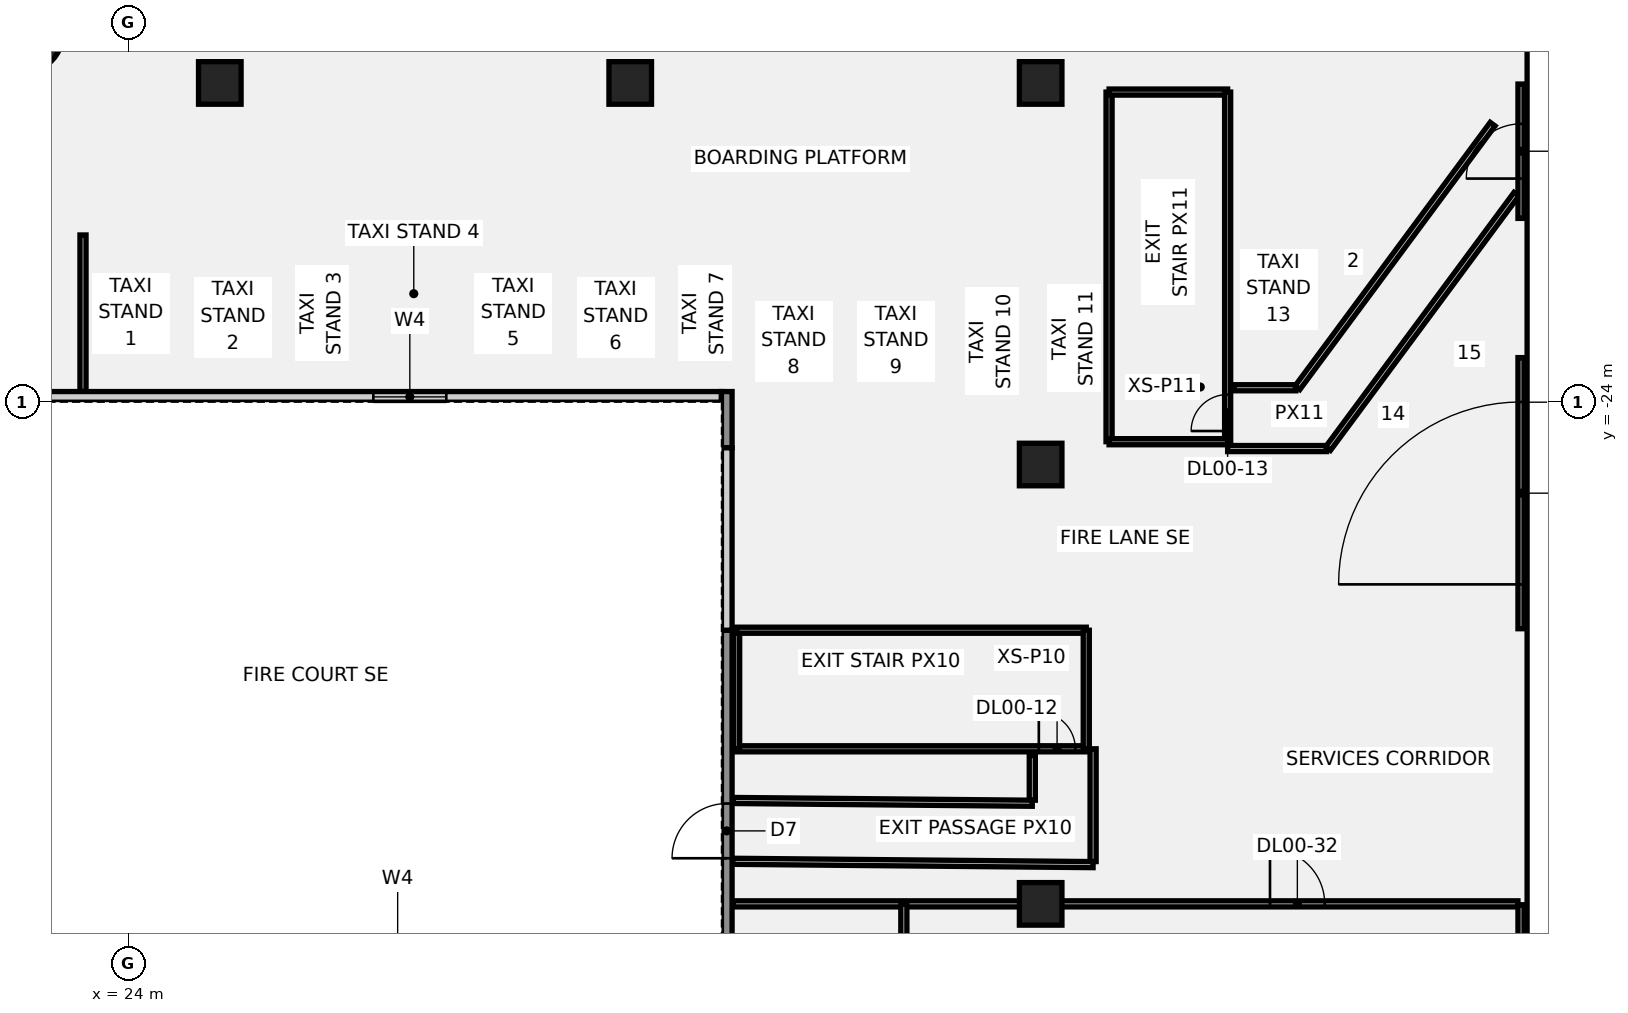
"""IFC4 building model, lengths in metres.
Left out: names, types, materials, properties, quantities, classifications, styles, units other than length and angle.
Written with IfcOpenShell. Run it as: python <this file> out.ifc"""

import sys

from ifc_helpers import new_model, si_unit, direction, frame, frame_2d, origin, origin_2d, place, context, subcontext, project, spatial, rectangle, circle, extrude, element, fill, save


model = new_model("IFC4")
c1 = context("Model", 3, precision=1e-05, world=origin(), true_north=direction((0.0, 1.0)))
c2 = subcontext(c1, "Body", "Model", "MODEL_VIEW")
j1 = project(units=[si_unit("LENGTHUNIT", "METRE"), si_unit("PLANEANGLEUNIT", "RADIAN")], contexts=[c1])
p1 = place(None, origin())
s1 = spatial("IfcSite", under=j1, at=p1, CompositionType="ELEMENT")
p2 = place(p1, origin())
s2 = spatial("IfcBuilding", under=s1, at=p2, CompositionType="ELEMENT")
p3 = place(p2, origin())
s3 = spatial("IfcBuildingStorey", under=s2, at=p3, CompositionType="ELEMENT", Elevation=0.0)
p4 = place(p3, frame((20.543, -11.86, -0.55), z_axis=(0.0, 0.0, 1.0), x_axis=(1.0, 0.0, 0.0)))
e1 = element("IfcColumn", 1, at=p4, inside=s3, PredefinedType="COLUMN", context=c2, shape_type="SweptSolid", body=[
    extrude(circle(Radius=1.3, at=origin_2d()), origin(), (0.0, 0.0, 1.0), 9.05),
])
for number, where, z_axis, x_axis in (
    (2, (27.0, -13.5, -0.55), (0.0, 0.0, 1.0), (1.0, 0.0, 0.0)),
    (3, (40.5, -13.5, -0.55), (0.0, 0.0, 1.0), (1.0, 0.0, 0.0)),
    (4, (54.0, -40.5, -0.55), (0.0, 0.0, 1.0), (1.0, 0.0, 0.0)),
    (5, (54.0, -26.05, -0.55), (0.0, 0.0, 1.0), (1.0, 0.0, 0.0)),
    (6, (54.0, -13.5, -0.55), (0.0, 0.0, 1.0), (1.0, 0.0, 0.0)),
):
    element("IfcColumn", number, at=place(p3, frame(where, z_axis=z_axis, x_axis=x_axis)), inside=s3, PredefinedType="COLUMN", context=c2, shape_type="SweptSolid", body=[
        extrude(rectangle(XDim=1.4, YDim=1.4, at=origin_2d()), origin(), (0.0, 0.0, 1.0), 9.05),
    ])
p5 = place(p3, frame((44.0, -35.4, 0.0), z_axis=(0.0, 0.0, 1.0), x_axis=(1.0, 0.0, 0.0)))
e7 = element("IfcWall", 7, at=p5, inside=s3, PredefinedType="PARTITIONING", context=c2, shape_type="SweptSolid", body=[
    extrude(rectangle(XDim=11.5, YDim=0.2, at=frame_2d((5.75, 0.0))), origin(), (0.0, 0.0, 1.0), 8.5),
])
p6 = place(p5, frame((9.94, 0.0, 0.0)))
e8 = element("IfcOpeningElement", 8, at=p6, cuts=e7, PredefinedType="OPENING", context=c2, shape_type="SweptSolid", body=[
    extrude(rectangle(XDim=1.2, YDim=2.1, at=frame_2d((0.6, 1.05))), frame((0.0, 0.11, 0.0), z_axis=(0.0, -1.0, 0.0), x_axis=(1.0, 0.0, 0.0)), (0.0, 0.0, 1.0), 0.22),
])
p7 = place(p3, frame((44.0, -35.4, 0.0), z_axis=(0.0, 0.0, 1.0), x_axis=(0.0, 1.0, 0.0)))
e9 = element("IfcWall", 9, at=p7, inside=s3, PredefinedType="PARTITIONING", context=c2, shape_type="SweptSolid", body=[
    extrude(rectangle(XDim=3.9, YDim=0.2, at=frame_2d((1.95, 0.0))), origin(), (0.0, 0.0, 1.0), 8.5),
])
p8 = place(p3, frame((44.0, -31.5, 0.0), z_axis=(0.0, 0.0, 1.0), x_axis=(1.0, 0.0, 0.0)))
e10 = element("IfcWall", 10, at=p8, inside=s3, PredefinedType="PARTITIONING", context=c2, shape_type="SweptSolid", body=[
    extrude(rectangle(XDim=11.5, YDim=0.2, at=frame_2d((5.75, 0.0))), origin(), (0.0, 0.0, 1.0), 8.5),
])
p9 = place(p3, frame((55.5, -35.4, 0.0), z_axis=(0.0, 0.0, 1.0), x_axis=(0.0, 1.0, 0.0)))
e11 = element("IfcWall", 11, at=p9, inside=s3, PredefinedType="PARTITIONING", context=c2, shape_type="SweptSolid", body=[
    extrude(rectangle(XDim=3.9, YDim=0.2, at=frame_2d((1.95, 0.0))), origin(), (0.0, 0.0, 1.0), 8.5),
])
p10 = place(p3, frame((56.25, -25.3, 0.0), z_axis=(0.0, 0.0, 1.0), x_axis=(0.0, 1.0, 0.0)))
e12 = element("IfcWall", 12, at=p10, inside=s3, PredefinedType="PARTITIONING", context=c2, shape_type="SweptSolid", body=[
    extrude(rectangle(XDim=11.5, YDim=0.2, at=frame_2d((5.75, 0.0))), origin(), (0.0, 0.0, 1.0), 8.5),
])
p11 = place(p3, frame((56.25, -13.8, 0.0), z_axis=(0.0, 0.0, 1.0), x_axis=(1.0, 0.0, 0.0)))
e13 = element("IfcWall", 13, at=p11, inside=s3, PredefinedType="PARTITIONING", context=c2, shape_type="SweptSolid", body=[
    extrude(rectangle(XDim=3.9, YDim=0.2, at=frame_2d((1.95, 0.0))), origin(), (0.0, 0.0, 1.0), 8.5),
])
p12 = place(p3, frame((60.15, -25.3, 0.0), z_axis=(0.0, 0.0, 1.0), x_axis=(0.0, 1.0, 0.0)))
e14 = element("IfcWall", 14, at=p12, inside=s3, PredefinedType="PARTITIONING", context=c2, shape_type="SweptSolid", body=[
    extrude(rectangle(XDim=11.5, YDim=0.2, at=frame_2d((5.75, 0.0))), origin(), (0.0, 0.0, 1.0), 8.5),
])
p13 = place(p12, frame((0.352, 0.0, 0.0)))
e15 = element("IfcOpeningElement", 15, at=p13, cuts=e14, PredefinedType="OPENING", context=c2, shape_type="SweptSolid", body=[
    extrude(rectangle(XDim=1.2, YDim=2.1, at=frame_2d((0.6, 1.05))), frame((0.0, 0.11, 0.0), z_axis=(0.0, -1.0, 0.0), x_axis=(1.0, 0.0, 0.0)), (0.0, 0.0, 1.0), 0.22),
])
p14 = place(p3, frame((56.25, -25.3, 0.0), z_axis=(0.0, 0.0, 1.0), x_axis=(1.0, 0.0, 0.0)))
e16 = element("IfcWall", 16, at=p14, inside=s3, PredefinedType="PARTITIONING", context=c2, shape_type="SweptSolid", body=[
    extrude(rectangle(XDim=3.9, YDim=0.2, at=frame_2d((1.95, 0.0))), origin(), (0.0, 0.0, 1.0), 8.5),
])
p15 = place(p3, frame((43.88, -40.5, 0.0), z_axis=(0.0, 0.0, 1.0), x_axis=(1.0, 0.0, 0.0)))
e17 = element("IfcWall", 17, at=p15, inside=s3, PredefinedType="PARTITIONING", context=c2, shape_type="SweptSolid", body=[
    extrude(rectangle(XDim=25.819, YDim=0.2, at=frame_2d((12.91, 0.0))), origin(), (0.0, 0.0, 1.0), 8.5),
])
p16 = place(p15, frame((17.663, 0.0, 0.0)))
e18 = element("IfcOpeningElement", 18, at=p16, cuts=e17, PredefinedType="OPENING", context=c2, shape_type="SweptSolid", body=[
    extrude(rectangle(XDim=1.8, YDim=2.1, at=frame_2d((0.9, 1.05))), frame((0.0, 0.11, 0.0), z_axis=(0.0, -1.0, 0.0), x_axis=(1.0, 0.0, 0.0)), (0.0, 0.0, 1.0), 0.22),
])
p17 = place(p3, frame((49.5, -59.699, 0.0), z_axis=(0.0, 0.0, 1.0), x_axis=(0.0, 1.0, 0.0)))
e19 = element("IfcWall", 19, at=p17, inside=s3, PredefinedType="PARTITIONING", context=c2, shape_type="SweptSolid", body=[
    extrude(rectangle(XDim=19.199, YDim=0.2, at=frame_2d((9.6, 0.0))), origin(), (0.0, 0.0, 1.0), 8.5),
])
p18 = place(p3, frame((22.5, -18.5, 0.0), z_axis=(0.0, 0.0, 1.0), x_axis=(0.0, -1.0, 0.0)))
e20 = element("IfcWall", 20, at=p18, inside=s3, PredefinedType="PARTITIONING", context=c2, shape_type="SweptSolid", body=[
    extrude(rectangle(XDim=5.15, YDim=0.2, at=frame_2d((2.575, 0.0))), origin(), (0.0, 0.0, 1.0), 8.5),
])
p19 = place(p3, frame((55.725, -35.4, 0.0), z_axis=(0.0, 0.0, 1.0), x_axis=(0.0, -1.0, 0.0)))
e21 = element("IfcWall", 21, at=p19, inside=s3, PredefinedType="PARTITIONING", context=c2, shape_type="SweptSolid", body=[
    extrude(rectangle(XDim=3.709, YDim=0.2, at=frame_2d((1.855, 0.0))), origin(), (0.0, 0.0, 1.0), 8.5),
])
p20 = place(p3, frame((55.725, -39.209, 0.0), z_axis=(0.0, 0.0, 1.0), x_axis=(-0.999957626969, 0.009205664901, 0.0)))
e22 = element("IfcWall", 22, at=p20, inside=s3, PredefinedType="PARTITIONING", context=c2, shape_type="SweptSolid", body=[
    extrude(rectangle(XDim=11.855, YDim=0.2, at=frame_2d((5.927, 0.0))), origin(), (0.0, 0.0, 1.0), 8.5),
])
p21 = place(p3, frame((53.725, -35.62, 0.0), z_axis=(0.0, 0.0, 1.0), x_axis=(0.0, -1.0, 0.0)))
e23 = element("IfcWall", 23, at=p21, inside=s3, PredefinedType="PARTITIONING", context=c2, shape_type="SweptSolid", body=[
    extrude(rectangle(XDim=1.471, YDim=0.2, at=frame_2d((0.735, 0.0))), origin(), (0.0, 0.0, 1.0), 8.5),
])
p22 = place(p3, frame((53.725, -37.191, 0.0), z_axis=(0.0, 0.0, 1.0), x_axis=(-0.999957602643, 0.009208306954, 0.0)))
e24 = element("IfcWall", 24, at=p22, inside=s3, PredefinedType="PARTITIONING", context=c2, shape_type="SweptSolid", body=[
    extrude(rectangle(XDim=9.836, YDim=0.2, at=frame_2d((4.918, 0.0))), origin(), (0.0, 0.0, 1.0), 8.5),
])
p23 = place(p3, frame((60.37, -23.525, 0.0), z_axis=(0.0, 0.0, 1.0), x_axis=(1.0, 0.0, 0.0)))
e25 = element("IfcWall", 25, at=p23, inside=s3, PredefinedType="PARTITIONING", context=c2, shape_type="SweptSolid", body=[
    extrude(rectangle(XDim=2.026, YDim=0.2, at=frame_2d((1.013, 0.0))), origin(), (0.0, 0.0, 1.0), 8.5),
])
p24 = place(p3, frame((62.446, -23.525, 0.0), z_axis=(0.0, 0.0, 1.0), x_axis=(0.595122553779, 0.803634958164, 0.0)))
e26 = element("IfcWall", 26, at=p24, inside=s3, PredefinedType="PARTITIONING", context=c2, shape_type="SweptSolid", body=[
    extrude(rectangle(XDim=10.788, YDim=0.2, at=frame_2d((5.394, 0.0))), origin(), (0.0, 0.0, 1.0), 8.5),
])
p25 = place(p3, frame((60.15, -25.525, 0.0), z_axis=(0.0, 0.0, 1.0), x_axis=(1.0, 0.0, 0.0)))
e27 = element("IfcWall", 27, at=p25, inside=s3, PredefinedType="PARTITIONING", context=c2, shape_type="SweptSolid", body=[
    extrude(rectangle(XDim=3.254, YDim=0.2, at=frame_2d((1.627, 0.0))), origin(), (0.0, 0.0, 1.0), 8.5),
])
p26 = place(p3, frame((63.454, -25.525, 0.0), z_axis=(0.0, 0.0, 1.0), x_axis=(0.595111462657, 0.803643171448, 0.0)))
e28 = element("IfcWall", 28, at=p26, inside=s3, PredefinedType="PARTITIONING", context=c2, shape_type="SweptSolid", body=[
    extrude(rectangle(XDim=10.412, YDim=0.2, at=frame_2d((5.206, 0.0))), origin(), (0.0, 0.0, 1.0), 8.5),
])
p27 = place(p3, frame((69.8, -44.947, 0.0), z_axis=(0.0, 0.0, 1.0), x_axis=(0.0, 1.0, 0.0)))
e29 = element("IfcWall", 29, at=p27, inside=s3, PredefinedType="SOLIDWALL", context=c2, shape_type="SweptSolid", body=[
    extrude(rectangle(XDim=4.419, YDim=0.2, at=frame_2d((2.209, 0.0))), origin(), (0.0, 0.0, 1.0), 2.9),
])
p28 = place(p27, frame((1.009, 0.0, 0.0)))
e30 = element("IfcOpeningElement", 30, at=p28, cuts=e29, PredefinedType="OPENING", context=c2, shape_type="SweptSolid", body=[
    extrude(rectangle(XDim=2.4, YDim=2.4, at=frame_2d((1.2, 1.2))), frame((0.0, 0.11, 0.0), z_axis=(0.0, -1.0, 0.0), x_axis=(1.0, 0.0, 0.0)), (0.0, 0.0, 1.0), 0.22),
])
p29 = place(p3, frame((69.8, -31.451, 0.0), z_axis=(0.0, 0.0, 1.0), x_axis=(0.0, 1.0, 0.0)))
e31 = element("IfcWall", 31, at=p29, inside=s3, PredefinedType="SOLIDWALL", context=c2, shape_type="SweptSolid", body=[
    extrude(rectangle(XDim=8.917, YDim=0.2, at=frame_2d((4.459, 0.0))), origin(), (0.0, 0.0, 1.0), 4.9),
])
p30 = place(p29, frame((1.459, 0.0, 0.0)))
e32 = element("IfcOpeningElement", 32, at=p30, cuts=e31, PredefinedType="OPENING", context=c2, shape_type="SweptSolid", body=[
    extrude(rectangle(XDim=6.0, YDim=4.5, at=frame_2d((3.0, 2.25))), frame((0.0, 0.11, 0.0), z_axis=(0.0, -1.0, 0.0), x_axis=(1.0, 0.0, 0.0)), (0.0, 0.0, 1.0), 0.22),
])
p31 = place(p3, frame((69.8, -17.955, 0.0), z_axis=(0.0, 0.0, 1.0), x_axis=(0.0, 1.0, 0.0)))
e33 = element("IfcWall", 33, at=p31, inside=s3, PredefinedType="SOLIDWALL", context=c2, shape_type="SweptSolid", body=[
    extrude(rectangle(XDim=4.419, YDim=0.2, at=frame_2d((2.209, 0.0))), origin(), (0.0, 0.0, 1.0), 2.9),
])
p32 = place(p31, frame((1.309, 0.0, 0.0)))
e34 = element("IfcOpeningElement", 34, at=p32, cuts=e33, PredefinedType="OPENING", context=c2, shape_type="SweptSolid", body=[
    extrude(rectangle(XDim=1.8, YDim=2.4, at=frame_2d((0.9, 1.2))), frame((0.0, 0.11, 0.0), z_axis=(0.0, -1.0, 0.0), x_axis=(1.0, 0.0, 0.0)), (0.0, 0.0, 1.0), 0.22),
])
p33 = place(p3, frame((16.8, -23.825, 0.0), z_axis=(0.0, 0.0, 1.0), x_axis=(1.0, 0.0, 0.0)))
e35 = element("IfcWall", 35, at=p33, inside=s3, PredefinedType="SOLIDWALL", context=c2, shape_type="SweptSolid", body=[
    extrude(rectangle(XDim=26.7, YDim=0.35, at=frame_2d((13.35, 0.0))), origin(), (0.0, 0.0, 1.0), 8.5),
])
p34 = place(p33, frame((15.25, 0.0, 1.0)))
e36 = element("IfcOpeningElement", 36, at=p34, cuts=e35, PredefinedType="OPENING", context=c2, shape_type="SweptSolid", body=[
    extrude(rectangle(XDim=2.4, YDim=1.8, at=frame_2d((1.2, 0.9))), frame((0.0, 0.185, 0.0), z_axis=(0.0, -1.0, 0.0), x_axis=(1.0, 0.0, 0.0)), (0.0, 0.0, 1.0), 0.37),
])
p35 = place(p3, frame((43.675, -42.35, 0.0), z_axis=(0.0, 0.0, 1.0), x_axis=(0.0, 1.0, 0.0)))
e37 = element("IfcWall", 37, at=p35, inside=s3, PredefinedType="SOLIDWALL", context=c2, shape_type="SweptSolid", body=[
    extrude(rectangle(XDim=10.85, YDim=0.35, at=frame_2d((5.425, 0.0))), origin(), (0.0, 0.0, 1.0), 8.5),
])
p36 = place(p35, frame((3.35, 0.0, 0.0)))
e38 = element("IfcOpeningElement", 38, at=p36, cuts=e37, PredefinedType="OPENING", context=c2, shape_type="SweptSolid", body=[
    extrude(rectangle(XDim=1.8, YDim=2.4, at=frame_2d((0.9, 1.2))), frame((0.0, 0.185, 0.0), z_axis=(0.0, -1.0, 0.0), x_axis=(1.0, 0.0, 0.0)), (0.0, 0.0, 1.0), 0.37),
])
p37 = place(p3, frame((43.675, -25.5, 0.0), z_axis=(0.0, 0.0, 1.0), x_axis=(0.0, 1.0, 0.0)))
e39 = element("IfcWall", 39, at=p37, inside=s3, PredefinedType="SOLIDWALL", context=c2, shape_type="SweptSolid", body=[
    extrude(rectangle(XDim=1.85, YDim=0.35, at=frame_2d((0.925, 0.0))), origin(), (0.0, 0.0, 1.0), 8.5),
])
p38 = place(p3, frame((43.675, -31.5, 4.9), z_axis=(0.0, 0.0, 1.0), x_axis=(0.0, 1.0, 0.0)))
e40 = element("IfcWall", 40, at=p38, inside=s3, PredefinedType="SOLIDWALL", context=c2, shape_type="SweptSolid", body=[
    extrude(rectangle(XDim=6.0, YDim=0.35, at=frame_2d((3.0, 0.0))), origin(), (0.0, 0.0, 1.0), 3.6),
])
p39 = place(p6, origin())
e41 = element("IfcDoor", 41, at=p39, inside=s3, OperationType="SINGLE_SWING_RIGHT", PredefinedType="DOOR", context=c2, shape_type="SweptSolid", body=[
    extrude(rectangle(XDim=1.2, YDim=2.1, at=frame_2d((0.6, 1.05))), frame((0.0, 0.025, 0.0), z_axis=(0.0, -1.0, 0.0), x_axis=(1.0, 0.0, 0.0)), (0.0, 0.0, 1.0), 0.05),
])
fill(e8, e41)
p40 = place(p13, origin())
e42 = element("IfcDoor", 42, at=p40, inside=s3, OperationType="SINGLE_SWING_LEFT", PredefinedType="DOOR", context=c2, shape_type="SweptSolid", body=[
    extrude(rectangle(XDim=1.2, YDim=2.1, at=frame_2d((0.6, 1.05))), frame((0.0, 0.025, 0.0), z_axis=(0.0, -1.0, 0.0), x_axis=(1.0, 0.0, 0.0)), (0.0, 0.0, 1.0), 0.05),
])
fill(e15, e42)
p41 = place(p16, origin())
e43 = element("IfcDoor", 43, at=p41, inside=s3, OperationType="SINGLE_SWING_RIGHT", PredefinedType="DOOR", context=c2, shape_type="SweptSolid", body=[
    extrude(rectangle(XDim=1.8, YDim=2.1, at=frame_2d((0.9, 1.05))), frame((0.0, 0.025, 0.0), z_axis=(0.0, -1.0, 0.0), x_axis=(1.0, 0.0, 0.0)), (0.0, 0.0, 1.0), 0.05),
])
fill(e18, e43)
p42 = place(p30, origin())
e44 = element("IfcDoor", 44, at=p42, inside=s3, OperationType="SINGLE_SWING_LEFT", PredefinedType="DOOR", context=c2, shape_type="SweptSolid", body=[
    extrude(rectangle(XDim=6.0, YDim=4.5, at=frame_2d((3.0, 2.25))), frame((0.0, 0.025, 0.0), z_axis=(0.0, -1.0, 0.0), x_axis=(1.0, 0.0, 0.0)), (0.0, 0.0, 1.0), 0.05),
])
fill(e32, e44)
p43 = place(p32, frame((1.8, 0.0, 0.0), z_axis=(0.0, 0.0, 1.0), x_axis=(-1.0, 0.0, 0.0)))
e45 = element("IfcDoor", 45, at=p43, inside=s3, OperationType="SINGLE_SWING_LEFT", PredefinedType="DOOR", context=c2, shape_type="SweptSolid", body=[
    extrude(rectangle(XDim=1.8, YDim=2.4, at=frame_2d((0.9, 1.2))), frame((0.0, 0.025, 0.0), z_axis=(0.0, -1.0, 0.0), x_axis=(1.0, 0.0, 0.0)), (0.0, 0.0, 1.0), 0.05),
])
fill(e34, e45)
p44 = place(p34, origin())
e46 = element("IfcWindow", 46, at=p44, inside=s3, PartitioningType="SINGLE_PANEL", PredefinedType="WINDOW", context=c2, shape_type="SweptSolid", body=[
    extrude(rectangle(XDim=2.4, YDim=1.8, at=frame_2d((1.2, 0.9))), frame((0.0, 0.03, 0.0), z_axis=(0.0, -1.0, 0.0), x_axis=(1.0, 0.0, 0.0)), (0.0, 0.0, 1.0), 0.06),
])
fill(e36, e46)
p45 = place(p36, origin())
e47 = element("IfcDoor", 47, at=p45, inside=s3, OperationType="SINGLE_SWING_LEFT", PredefinedType="DOOR", context=c2, shape_type="SweptSolid", body=[
    extrude(rectangle(XDim=1.8, YDim=2.4, at=frame_2d((0.9, 1.2))), frame((0.0, 0.025, 0.0), z_axis=(0.0, -1.0, 0.0), x_axis=(1.0, 0.0, 0.0)), (0.0, 0.0, 1.0), 0.05),
])
fill(e38, e47)
save(model, sys.argv[1])
